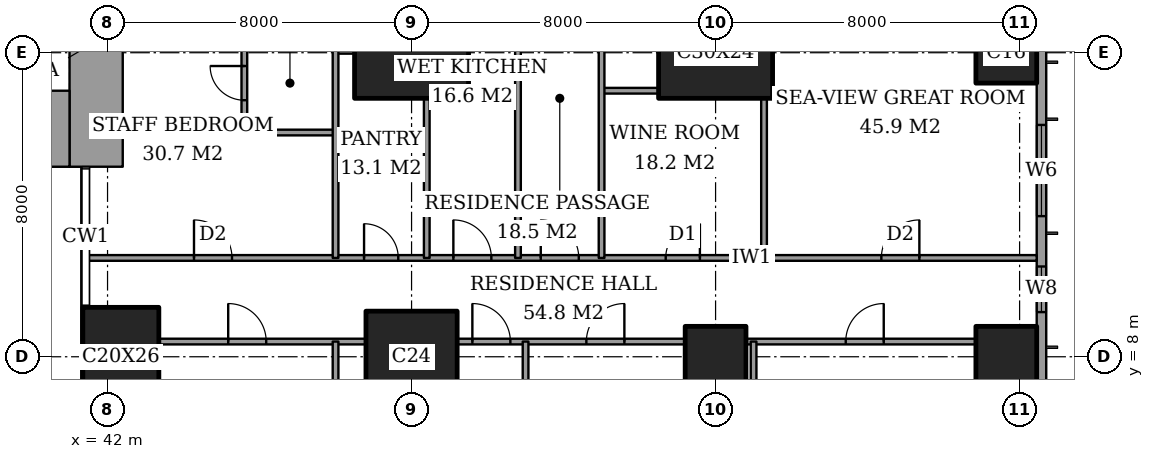
"""IFC4 building model, lengths in metres.
Left out: names, types, materials, properties, quantities, classifications, styles, units other than length and angle.
Written with IfcOpenShell. Run it as: python <this file> out.ifc"""

import sys

from ifc_helpers import new_model, si_unit, direction, frame, frame_2d, origin, origin_2d, place, context, subcontext, project, spatial, rectangle, extrude, element, fill, save


model = new_model("IFC4")
c1 = context("Model", 3, precision=1e-05, world=origin(), true_north=direction((0.0, 1.0)))
c2 = subcontext(c1, "Body", "Model", "MODEL_VIEW")
j1 = project(units=[si_unit("LENGTHUNIT", "METRE"), si_unit("PLANEANGLEUNIT", "RADIAN")], contexts=[c1])
p1 = place(None, origin())
s1 = spatial("IfcSite", under=j1, at=p1, CompositionType="ELEMENT")
p2 = place(p1, origin())
s2 = spatial("IfcBuilding", under=s1, at=p2, CompositionType="ELEMENT")
p3 = place(p2, frame((0.0, 0.0, 244.8)))
s3 = spatial("IfcBuildingStorey", under=s2, at=p3, CompositionType="ELEMENT", Elevation=244.8)
p4 = place(p3, frame((42.35, 8.0, 0.0), z_axis=(0.0, 0.0, 1.0), x_axis=(1.0, 0.0, 0.0)))
e1 = element("IfcColumn", 1, at=p4, inside=s3, PredefinedType="COLUMN", context=c2, shape_type="SweptSolid", body=[
    extrude(rectangle(XDim=2.0, YDim=2.6, at=origin_2d()), origin(), (0.0, 0.0, 1.0), 3.6),
])
p5 = place(p3, frame((50.0, 8.0, 0.0), z_axis=(0.0, 0.0, 1.0), x_axis=(1.0, 0.0, 0.0)))
e2 = element("IfcColumn", 2, at=p5, inside=s3, PredefinedType="COLUMN", context=c2, shape_type="SweptSolid", body=[
    extrude(rectangle(XDim=2.4, YDim=2.4, at=origin_2d()), origin(), (0.0, 0.0, 1.0), 3.6),
])
p6 = place(p3, frame((50.0, 16.0, 0.0), z_axis=(0.0, 0.0, 1.0), x_axis=(1.0, 0.0, 0.0)))
e3 = element("IfcColumn", 3, at=p6, inside=s3, PredefinedType="COLUMN", context=c2, shape_type="SweptSolid", body=[
    extrude(rectangle(XDim=3.0, YDim=2.4, at=origin_2d()), origin(), (0.0, 0.0, 1.0), 3.6),
])
p7 = place(p3, frame((58.0, 8.0, 0.0), z_axis=(0.0, 0.0, 1.0), x_axis=(1.0, 0.0, 0.0)))
e4 = element("IfcColumn", 4, at=p7, inside=s3, PredefinedType="COLUMN", context=c2, shape_type="SweptSolid", body=[
    extrude(rectangle(XDim=1.6, YDim=1.6, at=origin_2d()), origin(), (0.0, 0.0, 1.0), 3.6),
])
p8 = place(p3, frame((58.0, 16.0, 0.0), z_axis=(0.0, 0.0, 1.0), x_axis=(1.0, 0.0, 0.0)))
e5 = element("IfcColumn", 5, at=p8, inside=s3, PredefinedType="COLUMN", context=c2, shape_type="SweptSolid", body=[
    extrude(rectangle(XDim=3.0, YDim=2.4, at=origin_2d()), origin(), (0.0, 0.0, 1.0), 3.6),
])
for number, where, z_axis, x_axis in (
    (6, (65.65, 8.0, 0.0), (0.0, 0.0, 1.0), (1.0, 0.0, 0.0)),
    (7, (65.65, 16.0, 0.0), (0.0, 0.0, 1.0), (1.0, 0.0, 0.0)),
):
    element("IfcColumn", number, at=place(p3, frame(where, z_axis=z_axis, x_axis=x_axis)), inside=s3, PredefinedType="COLUMN", context=c2, shape_type="SweptSolid", body=[
        extrude(rectangle(XDim=1.6, YDim=1.6, at=origin_2d()), origin(), (0.0, 0.0, 1.0), 3.6),
    ])
p9 = place(p3, frame((37.85, 14.0, 0.0), z_axis=(0.0, 0.0, 1.0), x_axis=(1.0, 0.0, 0.0)))
e8 = element("IfcWall", 8, at=p9, inside=s3, PredefinedType="SHEAR", context=c2, shape_type="SweptSolid", body=[
    extrude(rectangle(XDim=3.15, YDim=2.0, at=frame_2d((1.575, 0.0))), origin(), (0.0, 0.0, 1.0), 3.6),
])
p10 = place(p3, frame((41.7, 13.0, 0.0), z_axis=(0.0, 0.0, 1.0), x_axis=(0.0, 1.0, 0.0)))
e9 = element("IfcWall", 9, at=p10, inside=s3, PredefinedType="SHEAR", context=c2, shape_type="SweptSolid", body=[
    extrude(rectangle(XDim=11.85, YDim=1.4, at=frame_2d((5.925, 0.0))), origin(), (0.0, 0.0, 1.0), 3.6),
])
p11 = place(p10, frame((7.5, 0.0, 0.0)))
e10 = element("IfcOpeningElement", 10, at=p11, cuts=e9, PredefinedType="OPENING", context=c2, shape_type="SweptSolid", body=[
    extrude(rectangle(XDim=1.8, YDim=2.4, at=frame_2d((0.9, 1.2))), frame((0.0, 0.71, 0.0), z_axis=(0.0, -1.0, 0.0), x_axis=(1.0, 0.0, 0.0)), (0.0, 0.0, 1.0), 1.42),
])
p12 = place(p3, frame((66.575, 3.175, 0.0), z_axis=(0.0, 0.0, 1.0), x_axis=(0.0, 1.0, 0.0)))
e11 = element("IfcWall", 11, at=p12, inside=s3, PredefinedType="SOLIDWALL", context=c2, shape_type="SweptSolid", body=[
    extrude(rectangle(XDim=41.65, YDim=0.25, at=frame_2d((20.825, 0.0))), origin(), (0.0, 0.0, 1.0), 3.6),
])
p13 = place(p12, frame((0.875, 0.0, 0.6)))
e12 = element("IfcOpeningElement", 12, at=p13, cuts=e11, PredefinedType="OPENING", context=c2, shape_type="SweptSolid", body=[
    extrude(rectangle(XDim=2.4, YDim=2.0, at=frame_2d((1.2, 1.0))), frame((0.0, 0.135, 0.0), z_axis=(0.0, -1.0, 0.0), x_axis=(1.0, 0.0, 0.0)), (0.0, 0.0, 1.0), 0.27),
])
p14 = place(p12, frame((6.0, 0.0, 0.6)))
e13 = element("IfcOpeningElement", 13, at=p14, cuts=e11, PredefinedType="OPENING", context=c2, shape_type="SweptSolid", body=[
    extrude(rectangle(XDim=1.2, YDim=2.0, at=frame_2d((0.6, 1.0))), frame((0.0, 0.135, 0.0), z_axis=(0.0, -1.0, 0.0), x_axis=(1.0, 0.0, 0.0)), (0.0, 0.0, 1.0), 0.27),
])
p15 = place(p12, frame((8.525, 0.0, 0.6)))
e14 = element("IfcOpeningElement", 14, at=p15, cuts=e11, PredefinedType="OPENING", context=c2, shape_type="SweptSolid", body=[
    extrude(rectangle(XDim=2.4, YDim=2.0, at=frame_2d((1.2, 1.0))), frame((0.0, 0.135, 0.0), z_axis=(0.0, -1.0, 0.0), x_axis=(1.0, 0.0, 0.0)), (0.0, 0.0, 1.0), 0.27),
])
p16 = place(p12, frame((15.725, 0.0, 0.6)))
e15 = element("IfcOpeningElement", 15, at=p16, cuts=e11, PredefinedType="OPENING", context=c2, shape_type="SweptSolid", body=[
    extrude(rectangle(XDim=2.4, YDim=2.0, at=frame_2d((1.2, 1.0))), frame((0.0, 0.135, 0.0), z_axis=(0.0, -1.0, 0.0), x_axis=(1.0, 0.0, 0.0)), (0.0, 0.0, 1.0), 0.27),
])
p17 = place(p12, frame((23.525, 0.0, 0.6)))
e16 = element("IfcOpeningElement", 16, at=p17, cuts=e11, PredefinedType="OPENING", context=c2, shape_type="SweptSolid", body=[
    extrude(rectangle(XDim=2.4, YDim=2.0, at=frame_2d((1.2, 1.0))), frame((0.0, 0.135, 0.0), z_axis=(0.0, -1.0, 0.0), x_axis=(1.0, 0.0, 0.0)), (0.0, 0.0, 1.0), 0.27),
])
p18 = place(p12, frame((30.625, 0.0, 0.6)))
e17 = element("IfcOpeningElement", 17, at=p18, cuts=e11, PredefinedType="OPENING", context=c2, shape_type="SweptSolid", body=[
    extrude(rectangle(XDim=2.4, YDim=2.0, at=frame_2d((1.2, 1.0))), frame((0.0, 0.135, 0.0), z_axis=(0.0, -1.0, 0.0), x_axis=(1.0, 0.0, 0.0)), (0.0, 0.0, 1.0), 0.27),
])
p19 = place(p12, frame((34.325, 0.0, 0.6)))
e18 = element("IfcOpeningElement", 18, at=p19, cuts=e11, PredefinedType="OPENING", context=c2, shape_type="SweptSolid", body=[
    extrude(rectangle(XDim=1.2, YDim=2.0, at=frame_2d((0.6, 1.0))), frame((0.0, 0.135, 0.0), z_axis=(0.0, -1.0, 0.0), x_axis=(1.0, 0.0, 0.0)), (0.0, 0.0, 1.0), 0.27),
])
p20 = place(p12, frame((38.375, 0.0, 0.6)))
e19 = element("IfcOpeningElement", 19, at=p20, cuts=e11, PredefinedType="OPENING", context=c2, shape_type="SweptSolid", body=[
    extrude(rectangle(XDim=2.4, YDim=2.0, at=frame_2d((1.2, 1.0))), frame((0.0, 0.135, 0.0), z_axis=(0.0, -1.0, 0.0), x_axis=(1.0, 0.0, 0.0)), (0.0, 0.0, 1.0), 0.27),
])
p21 = place(p3, frame((43.35, 8.4, 0.0), z_axis=(0.0, 0.0, 1.0), x_axis=(1.0, 0.0, 0.0)))
e20 = element("IfcWall", 20, at=p21, inside=s3, PredefinedType="PARTITIONING", context=c2, shape_type="SweptSolid", body=[
    extrude(rectangle(XDim=5.45, YDim=0.15, at=frame_2d((2.725, 0.0))), origin(), (0.0, 0.0, 1.0), 3.35),
])
p22 = place(p21, frame((1.825, 0.0, 0.0)))
e21 = element("IfcOpeningElement", 21, at=p22, cuts=e20, PredefinedType="OPENING", context=c2, shape_type="SweptSolid", body=[
    extrude(rectangle(XDim=1.0, YDim=2.1, at=frame_2d((0.5, 1.05))), frame((0.0, 0.085, 0.0), z_axis=(0.0, -1.0, 0.0), x_axis=(1.0, 0.0, 0.0)), (0.0, 0.0, 1.0), 0.17),
])
p23 = place(p3, frame((51.2, 8.4, 0.0), z_axis=(0.0, 0.0, 1.0), x_axis=(1.0, 0.0, 0.0)))
e22 = element("IfcWall", 22, at=p23, inside=s3, PredefinedType="PARTITIONING", context=c2, shape_type="SweptSolid", body=[
    extrude(rectangle(XDim=6.0, YDim=0.15, at=frame_2d((3.0, 0.0))), origin(), (0.0, 0.0, 1.0), 3.35),
])
p24 = place(p23, frame((3.4, 0.0, 0.0)))
e23 = element("IfcOpeningElement", 23, at=p24, cuts=e22, PredefinedType="OPENING", context=c2, shape_type="SweptSolid", body=[
    extrude(rectangle(XDim=1.0, YDim=2.1, at=frame_2d((0.5, 1.05))), frame((0.0, 0.085, 0.0), z_axis=(0.0, -1.0, 0.0), x_axis=(1.0, 0.0, 0.0)), (0.0, 0.0, 1.0), 0.17),
])
p25 = place(p23, frame((0.4, 0.0, 0.0)))
e24 = element("IfcOpeningElement", 24, at=p25, cuts=e22, PredefinedType="OPENING", context=c2, shape_type="SweptSolid", body=[
    extrude(rectangle(XDim=1.0, YDim=2.1, at=frame_2d((0.5, 1.05))), frame((0.0, 0.085, 0.0), z_axis=(0.0, -1.0, 0.0), x_axis=(1.0, 0.0, 0.0)), (0.0, 0.0, 1.0), 0.17),
])
p26 = place(p3, frame((58.8, 8.4, 0.0), z_axis=(0.0, 0.0, 1.0), x_axis=(1.0, 0.0, 0.0)))
e25 = element("IfcWall", 25, at=p26, inside=s3, PredefinedType="PARTITIONING", context=c2, shape_type="SweptSolid", body=[
    extrude(rectangle(XDim=6.05, YDim=0.15, at=frame_2d((3.025, 0.0))), origin(), (0.0, 0.0, 1.0), 3.35),
])
p27 = place(p26, frame((2.625, 0.0, 0.0)))
e26 = element("IfcOpeningElement", 26, at=p27, cuts=e25, PredefinedType="OPENING", context=c2, shape_type="SweptSolid", body=[
    extrude(rectangle(XDim=1.0, YDim=2.1, at=frame_2d((0.5, 1.05))), frame((0.0, 0.085, 0.0), z_axis=(0.0, -1.0, 0.0), x_axis=(1.0, 0.0, 0.0)), (0.0, 0.0, 1.0), 0.17),
])
p28 = place(p3, frame((41.439, 10.6, 0.0), z_axis=(0.0, 0.0, 1.0), x_axis=(1.0, 0.0, 0.0)))
e27 = element("IfcWall", 27, at=p28, inside=s3, PredefinedType="PARTITIONING", context=c2, shape_type="SweptSolid", body=[
    extrude(rectangle(XDim=25.011, YDim=0.15, at=frame_2d((12.505, 0.0))), origin(), (0.0, 0.0, 1.0), 3.35),
])
p29 = place(p28, frame((11.961, 0.0, 0.0)))
e28 = element("IfcOpeningElement", 28, at=p29, cuts=e27, PredefinedType="OPENING", context=c2, shape_type="SweptSolid", body=[
    extrude(rectangle(XDim=1.0, YDim=2.1, at=frame_2d((0.5, 1.05))), frame((0.0, 0.085, 0.0), z_axis=(0.0, -1.0, 0.0), x_axis=(1.0, 0.0, 0.0)), (0.0, 0.0, 1.0), 0.17),
])
p30 = place(p28, frame((20.924, 0.0, 0.0)))
e29 = element("IfcOpeningElement", 29, at=p30, cuts=e27, PredefinedType="OPENING", context=c2, shape_type="SweptSolid", body=[
    extrude(rectangle(XDim=1.0, YDim=2.1, at=frame_2d((0.5, 1.05))), frame((0.0, 0.085, 0.0), z_axis=(0.0, -1.0, 0.0), x_axis=(1.0, 0.0, 0.0)), (0.0, 0.0, 1.0), 0.17),
])
p31 = place(p28, frame((15.249, 0.0, 0.0)))
e30 = element("IfcOpeningElement", 30, at=p31, cuts=e27, PredefinedType="OPENING", context=c2, shape_type="SweptSolid", body=[
    extrude(rectangle(XDim=0.9, YDim=2.1, at=frame_2d((0.45, 1.05))), frame((0.0, 0.085, 0.0), z_axis=(0.0, -1.0, 0.0), x_axis=(1.0, 0.0, 0.0)), (0.0, 0.0, 1.0), 0.17),
])
p32 = place(p28, frame((9.661, 0.0, 0.0)))
e31 = element("IfcOpeningElement", 31, at=p32, cuts=e27, PredefinedType="OPENING", context=c2, shape_type="SweptSolid", body=[
    extrude(rectangle(XDim=1.0, YDim=2.1, at=frame_2d((0.5, 1.05))), frame((0.0, 0.085, 0.0), z_axis=(0.0, -1.0, 0.0), x_axis=(1.0, 0.0, 0.0)), (0.0, 0.0, 1.0), 0.17),
])
p33 = place(p28, frame((7.311, 0.0, 0.0)))
e32 = element("IfcOpeningElement", 32, at=p33, cuts=e27, PredefinedType="OPENING", context=c2, shape_type="SweptSolid", body=[
    extrude(rectangle(XDim=0.9, YDim=2.1, at=frame_2d((0.45, 1.05))), frame((0.0, 0.085, 0.0), z_axis=(0.0, -1.0, 0.0), x_axis=(1.0, 0.0, 0.0)), (0.0, 0.0, 1.0), 0.17),
])
p34 = place(p28, frame((2.836, 0.0, 0.0)))
e33 = element("IfcOpeningElement", 33, at=p34, cuts=e27, PredefinedType="OPENING", context=c2, shape_type="SweptSolid", body=[
    extrude(rectangle(XDim=1.0, YDim=2.1, at=frame_2d((0.5, 1.05))), frame((0.0, 0.085, 0.0), z_axis=(0.0, -1.0, 0.0), x_axis=(1.0, 0.0, 0.0)), (0.0, 0.0, 1.0), 0.17),
])
p35 = place(p3, frame((45.6, 13.9, 0.0), z_axis=(0.0, 0.0, 1.0), x_axis=(1.0, 0.0, 0.0)))
e34 = element("IfcWall", 34, at=p35, inside=s3, PredefinedType="PARTITIONING", context=c2, shape_type="SweptSolid", body=[
    extrude(rectangle(XDim=2.4, YDim=0.15, at=frame_2d((1.2, 0.0))), origin(), (0.0, 0.0, 1.0), 3.35),
])
p36 = place(p3, frame((55.0, 15.0, 0.0), z_axis=(0.0, 0.0, 1.0), x_axis=(1.0, 0.0, 0.0)))
e35 = element("IfcWall", 35, at=p36, inside=s3, PredefinedType="PARTITIONING", context=c2, shape_type="SweptSolid", body=[
    extrude(rectangle(XDim=1.5, YDim=0.15, at=frame_2d((0.75, 0.0))), origin(), (0.0, 0.0, 1.0), 3.35),
])
p37 = place(p3, frame((48.0, 16.05, 0.0), z_axis=(0.0, 0.0, 1.0), x_axis=(1.0, 0.0, 0.0)))
e36 = element("IfcWall", 36, at=p37, inside=s3, PredefinedType="PARTITIONING", context=c2, shape_type="SweptSolid", body=[
    extrude(rectangle(XDim=0.5, YDim=0.15, at=frame_2d((0.25, 0.0))), origin(), (0.0, 0.0, 1.0), 2.634),
])
p38 = place(p3, frame((45.6, 13.9, 0.0), z_axis=(0.0, 0.0, 1.0), x_axis=(0.0, 1.0, 0.0)))
e37 = element("IfcWall", 37, at=p38, inside=s3, PredefinedType="PARTITIONING", context=c2, shape_type="SweptSolid", body=[
    extrude(rectangle(XDim=2.6, YDim=0.15, at=frame_2d((1.3, 0.0))), origin(), (0.0, 0.0, 1.0), 3.35),
])
p39 = place(p38, frame((0.85, 0.0, 0.0)))
e38 = element("IfcOpeningElement", 38, at=p39, cuts=e37, PredefinedType="OPENING", context=c2, shape_type="SweptSolid", body=[
    extrude(rectangle(XDim=0.9, YDim=2.1, at=frame_2d((0.45, 1.05))), frame((0.0, 0.085, 0.0), z_axis=(0.0, -1.0, 0.0), x_axis=(1.0, 0.0, 0.0)), (0.0, 0.0, 1.0), 0.17),
])
p40 = place(p3, frame((48.0, -0.45, 0.0), z_axis=(0.0, 0.0, 1.0), x_axis=(0.0, 1.0, 0.0)))
e39 = element("IfcWall", 39, at=p40, inside=s3, PredefinedType="PARTITIONING", context=c2, shape_type="SweptSolid", body=[
    extrude(rectangle(XDim=8.85, YDim=0.15, at=frame_2d((4.425, 0.0))), origin(), (0.0, 0.0, 1.0), 3.35),
])
p41 = place(p3, frame((48.0, 10.6, 0.0), z_axis=(0.0, 0.0, 1.0), x_axis=(0.0, 1.0, 0.0)))
e40 = element("IfcWall", 40, at=p41, inside=s3, PredefinedType="PARTITIONING", context=c2, shape_type="SweptSolid", body=[
    extrude(rectangle(XDim=8.4, YDim=0.15, at=frame_2d((4.2, 0.0))), origin(), (0.0, 0.0, 1.0), 3.35),
])
p42 = place(p41, frame((6.7, 0.0, 0.0)))
e41 = element("IfcOpeningElement", 41, at=p42, cuts=e40, PredefinedType="OPENING", context=c2, shape_type="SweptSolid", body=[
    extrude(rectangle(XDim=0.9, YDim=2.1, at=frame_2d((0.45, 1.05))), frame((0.0, 0.085, 0.0), z_axis=(0.0, -1.0, 0.0), x_axis=(1.0, 0.0, 0.0)), (0.0, 0.0, 1.0), 0.17),
])
p43 = place(p3, frame((50.4, 10.6, 0.0), z_axis=(0.0, 0.0, 1.0), x_axis=(0.0, 1.0, 0.0)))
e42 = element("IfcWall", 42, at=p43, inside=s3, PredefinedType="PARTITIONING", context=c2, shape_type="SweptSolid", body=[
    extrude(rectangle(XDim=4.2, YDim=0.15, at=frame_2d((2.1, 0.0))), origin(), (0.0, 0.0, 1.0), 3.35),
])
p44 = place(p3, frame((52.8, 10.6, 0.0), z_axis=(0.0, 0.0, 1.0), x_axis=(0.0, 1.0, 0.0)))
e43 = element("IfcWall", 43, at=p44, inside=s3, PredefinedType="PARTITIONING", context=c2, shape_type="SweptSolid", body=[
    extrude(rectangle(XDim=8.4, YDim=0.15, at=frame_2d((4.2, 0.0))), origin(), (0.0, 0.0, 1.0), 3.35),
])
p45 = place(p3, frame((53.0, -0.45, 0.0), z_axis=(0.0, 0.0, 1.0), x_axis=(0.0, 1.0, 0.0)))
e44 = element("IfcWall", 44, at=p45, inside=s3, PredefinedType="PARTITIONING", context=c2, shape_type="SweptSolid", body=[
    extrude(rectangle(XDim=8.85, YDim=0.15, at=frame_2d((4.425, 0.0))), origin(), (0.0, 0.0, 1.0), 3.35),
])
p46 = place(p3, frame((55.0, 10.6, 0.0), z_axis=(0.0, 0.0, 1.0), x_axis=(0.0, 1.0, 0.0)))
e45 = element("IfcWall", 45, at=p46, inside=s3, PredefinedType="PARTITIONING", context=c2, shape_type="SweptSolid", body=[
    extrude(rectangle(XDim=11.0, YDim=0.15, at=frame_2d((5.5, 0.0))), origin(), (0.0, 0.0, 1.0), 3.35),
])
p47 = place(p46, frame((9.2, 0.0, 0.0)))
e46 = element("IfcOpeningElement", 46, at=p47, cuts=e45, PredefinedType="OPENING", context=c2, shape_type="SweptSolid", body=[
    extrude(rectangle(XDim=1.0, YDim=2.1, at=frame_2d((0.5, 1.05))), frame((0.0, 0.085, 0.0), z_axis=(0.0, -1.0, 0.0), x_axis=(1.0, 0.0, 0.0)), (0.0, 0.0, 1.0), 0.17),
])
p48 = place(p3, frame((59.0, -0.45, 0.0), z_axis=(0.0, 0.0, 1.0), x_axis=(0.0, 1.0, 0.0)))
e47 = element("IfcWall", 47, at=p48, inside=s3, PredefinedType="PARTITIONING", context=c2, shape_type="SweptSolid", body=[
    extrude(rectangle(XDim=8.85, YDim=0.15, at=frame_2d((4.425, 0.0))), origin(), (0.0, 0.0, 1.0), 3.35),
])
p49 = place(p3, frame((59.275, 10.6, 0.0), z_axis=(0.0, 0.0, 1.0), x_axis=(0.0, 1.0, 0.0)))
e48 = element("IfcWall", 48, at=p49, inside=s3, PredefinedType="PARTITIONING", context=c2, shape_type="SweptSolid", body=[
    extrude(rectangle(XDim=4.2, YDim=0.15, at=frame_2d((2.1, 0.0))), origin(), (0.0, 0.0, 1.0), 3.35),
])
p50 = place(p14, origin())
e49 = element("IfcWindow", 49, at=p50, inside=s3, PartitioningType="SINGLE_PANEL", PredefinedType="WINDOW", context=c2, shape_type="SweptSolid", body=[
    extrude(rectangle(XDim=1.2, YDim=2.0, at=frame_2d((0.6, 1.0))), frame((0.0, 0.03, 0.0), z_axis=(0.0, -1.0, 0.0), x_axis=(1.0, 0.0, 0.0)), (0.0, 0.0, 1.0), 0.06),
])
fill(e13, e49)
p51 = place(p15, origin())
e50 = element("IfcWindow", 50, at=p51, inside=s3, PartitioningType="SINGLE_PANEL", PredefinedType="WINDOW", context=c2, shape_type="SweptSolid", body=[
    extrude(rectangle(XDim=2.4, YDim=2.0, at=frame_2d((1.2, 1.0))), frame((0.0, 0.03, 0.0), z_axis=(0.0, -1.0, 0.0), x_axis=(1.0, 0.0, 0.0)), (0.0, 0.0, 1.0), 0.06),
])
fill(e14, e50)
p52 = place(p27, origin())
e51 = element("IfcDoor", 51, at=p52, inside=s3, OperationType="SINGLE_SWING_LEFT", PredefinedType="DOOR", context=c2, shape_type="SweptSolid", body=[
    extrude(rectangle(XDim=1.0, YDim=2.1, at=frame_2d((0.5, 1.05))), frame((0.0, 0.025, 0.0), z_axis=(0.0, -1.0, 0.0), x_axis=(1.0, 0.0, 0.0)), (0.0, 0.0, 1.0), 0.05),
])
fill(e26, e51)
p53 = place(p24, origin())
e52 = element("IfcDoor", 52, at=p53, inside=s3, OperationType="SINGLE_SWING_LEFT", PredefinedType="DOOR", context=c2, shape_type="SweptSolid", body=[
    extrude(rectangle(XDim=1.0, YDim=2.1, at=frame_2d((0.5, 1.05))), frame((0.0, 0.025, 0.0), z_axis=(0.0, -1.0, 0.0), x_axis=(1.0, 0.0, 0.0)), (0.0, 0.0, 1.0), 0.05),
])
fill(e23, e52)
p54 = place(p25, origin())
e53 = element("IfcDoor", 53, at=p54, inside=s3, OperationType="SINGLE_SWING_RIGHT", PredefinedType="DOOR", context=c2, shape_type="SweptSolid", body=[
    extrude(rectangle(XDim=1.0, YDim=2.1, at=frame_2d((0.5, 1.05))), frame((0.0, 0.025, 0.0), z_axis=(0.0, -1.0, 0.0), x_axis=(1.0, 0.0, 0.0)), (0.0, 0.0, 1.0), 0.05),
])
fill(e24, e53)
p55 = place(p22, origin())
e54 = element("IfcDoor", 54, at=p55, inside=s3, OperationType="SINGLE_SWING_RIGHT", PredefinedType="DOOR", context=c2, shape_type="SweptSolid", body=[
    extrude(rectangle(XDim=1.0, YDim=2.1, at=frame_2d((0.5, 1.05))), frame((0.0, 0.025, 0.0), z_axis=(0.0, -1.0, 0.0), x_axis=(1.0, 0.0, 0.0)), (0.0, 0.0, 1.0), 0.05),
])
fill(e21, e54)
p56 = place(p29, origin())
e55 = element("IfcDoor", 55, at=p56, inside=s3, OperationType="SINGLE_SWING_RIGHT", PredefinedType="DOOR", context=c2, shape_type="SweptSolid", body=[
    extrude(rectangle(XDim=1.0, YDim=2.1, at=frame_2d((0.5, 1.05))), frame((0.0, 0.025, 0.0), z_axis=(0.0, -1.0, 0.0), x_axis=(1.0, 0.0, 0.0)), (0.0, 0.0, 1.0), 0.05),
])
fill(e28, e55)
p57 = place(p30, origin())
e56 = element("IfcDoor", 56, at=p57, inside=s3, OperationType="SINGLE_SWING_LEFT", PredefinedType="DOOR", context=c2, shape_type="SweptSolid", body=[
    extrude(rectangle(XDim=1.0, YDim=2.1, at=frame_2d((0.5, 1.05))), frame((0.0, 0.025, 0.0), z_axis=(0.0, -1.0, 0.0), x_axis=(1.0, 0.0, 0.0)), (0.0, 0.0, 1.0), 0.05),
])
fill(e29, e56)
p58 = place(p31, origin())
e57 = element("IfcDoor", 57, at=p58, inside=s3, OperationType="SINGLE_SWING_LEFT", PredefinedType="DOOR", context=c2, shape_type="SweptSolid", body=[
    extrude(rectangle(XDim=0.9, YDim=2.1, at=frame_2d((0.45, 1.05))), frame((0.0, 0.025, 0.0), z_axis=(0.0, -1.0, 0.0), x_axis=(1.0, 0.0, 0.0)), (0.0, 0.0, 1.0), 0.05),
])
fill(e30, e57)
p59 = place(p32, origin())
e58 = element("IfcDoor", 58, at=p59, inside=s3, OperationType="SINGLE_SWING_RIGHT", PredefinedType="DOOR", context=c2, shape_type="SweptSolid", body=[
    extrude(rectangle(XDim=1.0, YDim=2.1, at=frame_2d((0.5, 1.05))), frame((0.0, 0.025, 0.0), z_axis=(0.0, -1.0, 0.0), x_axis=(1.0, 0.0, 0.0)), (0.0, 0.0, 1.0), 0.05),
])
fill(e31, e58)
p60 = place(p33, origin())
e59 = element("IfcDoor", 59, at=p60, inside=s3, OperationType="SINGLE_SWING_RIGHT", PredefinedType="DOOR", context=c2, shape_type="SweptSolid", body=[
    extrude(rectangle(XDim=0.9, YDim=2.1, at=frame_2d((0.45, 1.05))), frame((0.0, 0.025, 0.0), z_axis=(0.0, -1.0, 0.0), x_axis=(1.0, 0.0, 0.0)), (0.0, 0.0, 1.0), 0.05),
])
fill(e32, e59)
p61 = place(p39, origin())
e60 = element("IfcDoor", 60, at=p61, inside=s3, OperationType="SINGLE_SWING_LEFT", PredefinedType="DOOR", context=c2, shape_type="SweptSolid", body=[
    extrude(rectangle(XDim=0.9, YDim=2.1, at=frame_2d((0.45, 1.05))), frame((0.0, 0.025, 0.0), z_axis=(0.0, -1.0, 0.0), x_axis=(1.0, 0.0, 0.0)), (0.0, 0.0, 1.0), 0.05),
])
fill(e38, e60)
p62 = place(p34, origin())
e61 = element("IfcDoor", 61, at=p62, inside=s3, OperationType="SINGLE_SWING_RIGHT", PredefinedType="DOOR", context=c2, shape_type="SweptSolid", body=[
    extrude(rectangle(XDim=1.0, YDim=2.1, at=frame_2d((0.5, 1.05))), frame((0.0, 0.025, 0.0), z_axis=(0.0, -1.0, 0.0), x_axis=(1.0, 0.0, 0.0)), (0.0, 0.0, 1.0), 0.05),
])
fill(e33, e61)
save(model, sys.argv[1])
